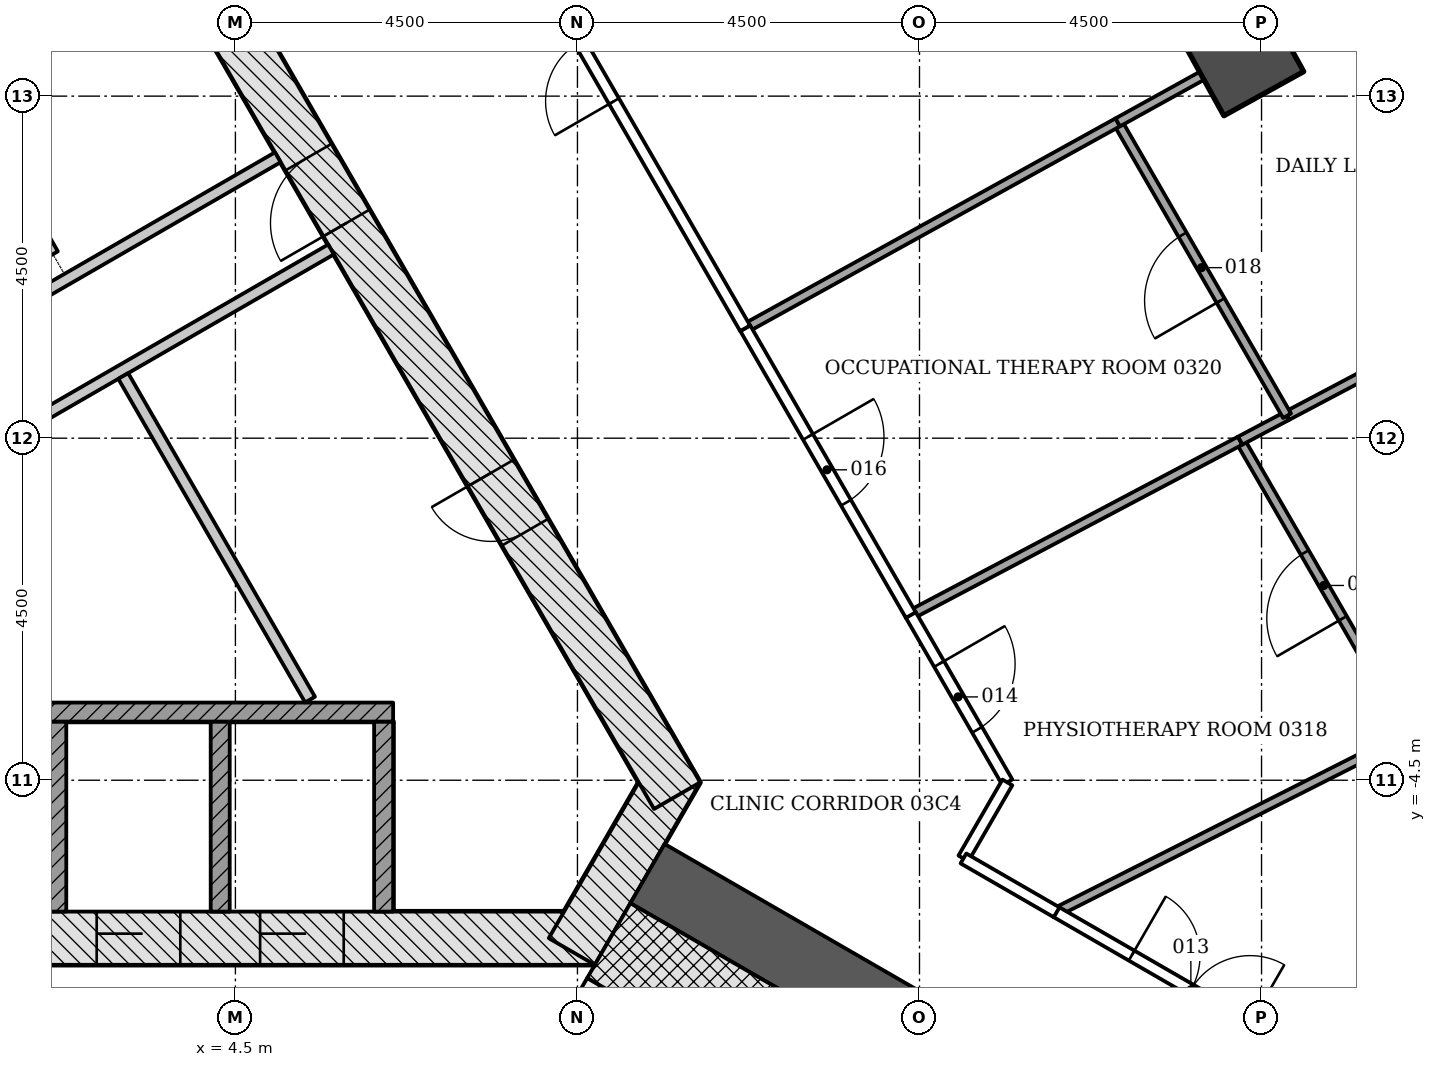
"""IFC4 building model, lengths in metres.
Left out: names, types, materials, properties, quantities, classifications, styles, units other than length and angle.
Written with IfcOpenShell. Run it as: python <this file> out.ifc"""

import sys

from ifc_helpers import new_model, si_unit, direction, frame, frame_2d, origin, origin_2d, place, context, subcontext, project, spatial, rectangle, extrude, element, fill, save


model = new_model("IFC4")
c1 = context("Model", 3, precision=1e-05, world=origin(), true_north=direction((0.0, 1.0)))
c2 = subcontext(c1, "Body", "Model", "MODEL_VIEW")
j1 = project(units=[si_unit("LENGTHUNIT", "METRE"), si_unit("PLANEANGLEUNIT", "RADIAN")], contexts=[c1])
p1 = place(None, origin())
s1 = spatial("IfcSite", under=j1, at=p1, CompositionType="ELEMENT")
p2 = place(p1, origin())
s2 = spatial("IfcBuilding", under=s1, at=p2, CompositionType="ELEMENT")
p3 = place(p2, frame((0.0, 0.0, 15.0)))
s3 = spatial("IfcBuildingStorey", under=s2, at=p3, CompositionType="ELEMENT", Elevation=15.0)
p4 = place(p3, frame((17.739, 5.058, -0.25), z_axis=(0.0, 0.0, 1.0), x_axis=(0.875152760281, 0.483846717641, 0.0)))
e1 = element("IfcColumn", 1, at=p4, inside=s3, PredefinedType="COLUMN", context=c2, shape_type="SweptSolid", body=[
    extrude(rectangle(XDim=1.2, YDim=1.2, at=origin_2d()), origin(), (0.0, 0.0, 1.0), 4.5),
])
p5 = place(p3, frame((-9.229, -6.578, -0.25), z_axis=(0.0, 0.0, 1.0), x_axis=(1.0, 0.0, 0.0)))
e2 = element("IfcWall", 2, at=p5, inside=s3, PredefinedType="SHEAR", context=c2, shape_type="SweptSolid", body=[
    extrude(rectangle(XDim=18.458, YDim=0.7, at=frame_2d((9.229, 0.0))), origin(), (0.0, 0.0, 1.0), 4.5),
])
p6 = place(p5, frame((3.304, 0.0, 0.25)))
e3 = element("IfcOpeningElement", 3, at=p6, cuts=e2, PredefinedType="OPENING", context=c2, shape_type="SweptSolid", body=[
    extrude(rectangle(XDim=1.1, YDim=2.1, at=frame_2d((0.55, 1.05))), frame((0.0, 0.36, 0.0), z_axis=(0.0, -1.0, 0.0), x_axis=(1.0, 0.0, 0.0)), (0.0, 0.0, 1.0), 0.72),
])
p7 = place(p5, frame((5.454, 0.0, 0.25)))
e4 = element("IfcOpeningElement", 4, at=p7, cuts=e2, PredefinedType="OPENING", context=c2, shape_type="SweptSolid", body=[
    extrude(rectangle(XDim=1.1, YDim=2.1, at=frame_2d((0.55, 1.05))), frame((0.0, 0.36, 0.0), z_axis=(0.0, -1.0, 0.0), x_axis=(1.0, 0.0, 0.0)), (0.0, 0.0, 1.0), 0.72),
])
p8 = place(p5, frame((7.604, 0.0, 0.25)))
e5 = element("IfcOpeningElement", 5, at=p8, cuts=e2, PredefinedType="OPENING", context=c2, shape_type="SweptSolid", body=[
    extrude(rectangle(XDim=1.1, YDim=2.1, at=frame_2d((0.55, 1.05))), frame((0.0, 0.36, 0.0), z_axis=(0.0, -1.0, 0.0), x_axis=(1.0, 0.0, 0.0)), (0.0, 0.0, 1.0), 0.72),
])
p9 = place(p5, frame((9.754, 0.0, 0.25)))
e6 = element("IfcOpeningElement", 6, at=p9, cuts=e2, PredefinedType="OPENING", context=c2, shape_type="SweptSolid", body=[
    extrude(rectangle(XDim=1.1, YDim=2.1, at=frame_2d((0.55, 1.05))), frame((0.0, 0.36, 0.0), z_axis=(0.0, -1.0, 0.0), x_axis=(1.0, 0.0, 0.0)), (0.0, 0.0, 1.0), 0.72),
])
p10 = place(p5, frame((11.904, 0.0, 0.25)))
e7 = element("IfcOpeningElement", 7, at=p10, cuts=e2, PredefinedType="OPENING", context=c2, shape_type="SweptSolid", body=[
    extrude(rectangle(XDim=1.1, YDim=2.1, at=frame_2d((0.55, 1.05))), frame((0.0, 0.36, 0.0), z_axis=(0.0, -1.0, 0.0), x_axis=(1.0, 0.0, 0.0)), (0.0, 0.0, 1.0), 0.72),
])
p11 = place(p5, frame((14.054, 0.0, 0.25)))
e8 = element("IfcOpeningElement", 8, at=p11, cuts=e2, PredefinedType="OPENING", context=c2, shape_type="SweptSolid", body=[
    extrude(rectangle(XDim=1.1, YDim=2.1, at=frame_2d((0.55, 1.05))), frame((0.0, 0.36, 0.0), z_axis=(0.0, -1.0, 0.0), x_axis=(1.0, 0.0, 0.0)), (0.0, 0.0, 1.0), 0.72),
])
p12 = place(p5, frame((1.079, 0.0, 0.25)))
e9 = element("IfcOpeningElement", 9, at=p12, cuts=e2, PredefinedType="OPENING", context=c2, shape_type="SweptSolid", body=[
    extrude(rectangle(XDim=0.9, YDim=2.1, at=frame_2d((0.45, 1.05))), frame((0.0, 0.36, 0.0), z_axis=(0.0, -1.0, 0.0), x_axis=(1.0, 0.0, 0.0)), (0.0, 0.0, 1.0), 0.72),
])
p13 = place(p3, frame((8.926, -6.753, -0.25), z_axis=(0.0, 0.0, 1.0), x_axis=(0.500042739161, 0.866000726912, 0.0)))
e10 = element("IfcWall", 10, at=p13, inside=s3, PredefinedType="SHEAR", context=c2, shape_type="SweptSolid", body=[
    extrude(rectangle(XDim=2.771, YDim=0.7, at=frame_2d((1.386, 0.0))), origin(), (0.0, 0.0, 1.0), 4.5),
])
p14 = place(p3, frame((10.311, -4.703, -0.25), z_axis=(0.0, 0.0, 1.0), x_axis=(-0.500001446645, 0.866024568562, 0.0)))
e11 = element("IfcWall", 11, at=p14, inside=s3, PredefinedType="SHEAR", context=c2, shape_type="SweptSolid", body=[
    extrude(rectangle(XDim=18.458, YDim=0.7, at=frame_2d((9.229, 0.0))), origin(), (0.0, 0.0, 1.0), 4.5),
])
p15 = place(p14, frame((8.7, 0.0, 0.25)))
e12 = element("IfcOpeningElement", 12, at=p15, cuts=e11, PredefinedType="OPENING", context=c2, shape_type="SweptSolid", body=[
    extrude(rectangle(XDim=1.0, YDim=2.1, at=frame_2d((0.5, 1.05))), frame((0.0, 0.36, 0.0), z_axis=(0.0, -1.0, 0.0), x_axis=(1.0, 0.0, 0.0)), (0.0, 0.0, 1.0), 0.72),
])
p16 = place(p14, frame((4.002, 0.0, 0.25)))
e13 = element("IfcOpeningElement", 13, at=p16, cuts=e11, PredefinedType="OPENING", context=c2, shape_type="SweptSolid", body=[
    extrude(rectangle(XDim=0.9, YDim=2.1, at=frame_2d((0.45, 1.05))), frame((0.0, 0.36, 0.0), z_axis=(0.0, -1.0, 0.0), x_axis=(1.0, 0.0, 0.0)), (0.0, 0.0, 1.0), 0.72),
])
p17 = place(p14, frame((14.093, 0.0, 0.25)))
e14 = element("IfcOpeningElement", 14, at=p17, cuts=e11, PredefinedType="OPENING", context=c2, shape_type="SweptSolid", body=[
    extrude(rectangle(XDim=0.9, YDim=2.1, at=frame_2d((0.45, 1.05))), frame((0.0, 0.36, 0.0), z_axis=(0.0, -1.0, 0.0), x_axis=(1.0, 0.0, 0.0)), (0.0, 0.0, 1.0), 0.72),
])
p18 = place(p3, frame((9.922, -5.728, -0.25), z_axis=(0.0, 0.0, 1.0), x_axis=(0.866028046028, -0.499995423472, 0.0)))
e15 = element("IfcWall", 15, at=p18, inside=s3, PredefinedType="SHEAR", context=c2, shape_type="SweptSolid", body=[
    extrude(rectangle(XDim=14.633, YDim=0.9, at=frame_2d((7.316, 0.0))), origin(), (0.0, 0.0, 1.0), 4.5),
])
p19 = place(p18, frame((7.35, 0.0, 0.25)))
e16 = element("IfcOpeningElement", 16, at=p19, cuts=e15, PredefinedType="OPENING", context=c2, shape_type="SweptSolid", body=[
    extrude(rectangle(XDim=1.5, YDim=2.1, at=frame_2d((0.75, 1.05))), frame((0.0, 0.46, 0.0), z_axis=(0.0, -1.0, 0.0), x_axis=(1.0, 0.0, 0.0)), (0.0, 0.0, 1.0), 0.92),
])
for number, where, z_axis, x_axis in (
    (17, (2.15, -6.228, -0.25), (0.0, 0.0, 1.0), (0.0, 1.0, 0.0)),
    (18, (4.3, -6.228, -0.25), (0.0, 0.0, 1.0), (0.0, 1.0, 0.0)),
    (19, (6.45, -6.228, -0.25), (0.0, 0.0, 1.0), (0.0, 1.0, 0.0)),
):
    element("IfcWall", number, at=place(p3, frame(where, z_axis=z_axis, x_axis=x_axis)), inside=s3, PredefinedType="PARTITIONING", context=c2, shape_type="SweptSolid", body=[
        extrude(rectangle(XDim=2.5, YDim=0.25, at=frame_2d((1.25, 0.0))), origin(), (0.0, 0.0, 1.0), 4.5),
    ])
p20 = place(p3, frame((-6.575, -3.603, 0.0), z_axis=(0.0, 0.0, 1.0), x_axis=(1.0, 0.0, 0.0)))
e20 = element("IfcWall", 20, at=p20, inside=s3, PredefinedType="PARTITIONING", context=c2, shape_type="SweptSolid", body=[
    extrude(rectangle(XDim=13.15, YDim=0.25, at=frame_2d((6.575, 0.0))), origin(), (0.0, 0.0, 1.0), 4.25),
])
p21 = place(p3, frame((-4.548, -1.851, 0.0), z_axis=(0.0, 0.0, 1.0), x_axis=(0.866023939251, 0.500002536638, 0.0)))
e21 = element("IfcWall", 21, at=p21, inside=s3, PredefinedType="PARTITIONING", context=c2, shape_type="SweptSolid", body=[
    extrude(rectangle(XDim=11.092, YDim=0.15, at=frame_2d((5.546, 0.0))), origin(), (0.0, 0.0, 1.0), 4.25),
])
p22 = place(p21, frame((3.497, 0.0, 0.0)))
e22 = element("IfcOpeningElement", 22, at=p22, cuts=e21, PredefinedType="OPENING", context=c2, shape_type="SweptSolid", body=[
    extrude(rectangle(XDim=0.9, YDim=2.1, at=frame_2d((0.45, 1.05))), frame((0.0, 0.085, 0.0), z_axis=(0.0, -1.0, 0.0), x_axis=(1.0, 0.0, 0.0)), (0.0, 0.0, 1.0), 0.17),
])
p23 = place(p3, frame((2.099, 2.42, 0.0), z_axis=(0.0, 0.0, 1.0), x_axis=(-0.499998449073, 0.866026299211, 0.0)))
e23 = element("IfcWall", 23, at=p23, inside=s3, PredefinedType="PARTITIONING", context=c2, shape_type="SweptSolid", body=[
    extrude(rectangle(XDim=4.211, YDim=0.15, at=frame_2d((2.106, 0.0))), origin(), (0.0, 0.0, 1.0), 4.25),
])
p24 = place(p3, frame((-4.454, -3.413, 0.0), z_axis=(0.0, 0.0, 1.0), x_axis=(0.86603043987, 0.499991277142, 0.0)))
e24 = element("IfcWall", 24, at=p24, inside=s3, PredefinedType="PARTITIONING", context=c2, shape_type="SweptSolid", body=[
    extrude(rectangle(XDim=11.792, YDim=0.15, at=frame_2d((5.896, 0.0))), origin(), (0.0, 0.0, 1.0), 4.25),
])
p25 = place(p24, frame((3.847, 0.0, 0.0)))
e25 = element("IfcOpeningElement", 25, at=p25, cuts=e24, PredefinedType="OPENING", context=c2, shape_type="SweptSolid", body=[
    extrude(rectangle(XDim=0.9, YDim=2.1, at=frame_2d((0.45, 1.05))), frame((0.0, 0.085, 0.0), z_axis=(0.0, -1.0, 0.0), x_axis=(1.0, 0.0, 0.0)), (0.0, 0.0, 1.0), 0.17),
])
p26 = place(p3, frame((5.482, -3.439, 0.0), z_axis=(0.0, 0.0, 1.0), x_axis=(-0.500006183238, 0.866021833861, 0.0)))
e26 = element("IfcWall", 26, at=p26, inside=s3, PredefinedType="PARTITIONING", context=c2, shape_type="SweptSolid", body=[
    extrude(rectangle(XDim=4.916, YDim=0.15, at=frame_2d((2.458, 0.0))), origin(), (0.0, 0.0, 1.0), 4.25),
])
p27 = place(p3, frame((7.44, -10.226, -0.25), z_axis=(0.0, 0.0, 1.0), x_axis=(0.500022077904, 0.866012656725, 0.0)))
e27 = element("IfcWall", 27, at=p27, inside=s3, PredefinedType="SHEAR", context=c2, shape_type="SweptSolid", body=[
    extrude(rectangle(XDim=3.55, YDim=0.2, at=frame_2d((1.775, 0.0))), origin(), (0.0, 0.0, 1.0), 4.5),
])
p28 = place(p27, frame((1.175, 0.0, 0.25)))
e28 = element("IfcOpeningElement", 28, at=p28, cuts=e27, PredefinedType="OPENING", context=c2, shape_type="SweptSolid", body=[
    extrude(rectangle(XDim=1.2, YDim=2.1, at=frame_2d((0.6, 1.05))), frame((0.0, 0.11, 0.0), z_axis=(0.0, -1.0, 0.0), x_axis=(1.0, 0.0, 0.0)), (0.0, 0.0, 1.0), 0.22),
])
p29 = place(p3, frame((9.413, -6.61, -0.25), z_axis=(0.0, 0.0, 1.0), x_axis=(0.866018442252, -0.500012057535, 0.0)))
e29 = element("IfcWall", 29, at=p29, inside=s3, PredefinedType="SHEAR", context=c2, shape_type="SweptSolid", body=[
    extrude(rectangle(XDim=7.2, YDim=1.136, at=frame_2d((3.6, 0.0))), origin(), (0.0, 0.0, 1.0), 4.5),
])
p30 = place(p3, frame((19.942, -3.888, 0.0), z_axis=(0.0, 0.0, 1.0), x_axis=(-0.89243804137, -0.451169970539, 0.0)))
e30 = element("IfcWall", 30, at=p30, inside=s3, PredefinedType="PARTITIONING", context=c2, shape_type="SweptSolid", body=[
    extrude(rectangle(XDim=5.202, YDim=0.12, at=frame_2d((2.601, 0.0))), origin(), (0.0, 0.0, 1.0), 3.638),
])
p31 = place(p3, frame((15.295, -6.232, 0.0), z_axis=(0.0, 0.0, 1.0), x_axis=(0.865991915229, -0.500057999394, 0.0)))
e31 = element("IfcWall", 31, at=p31, inside=s3, PredefinedType="PARTITIONING", context=c2, shape_type="SweptSolid", body=[
    extrude(rectangle(XDim=4.094, YDim=0.15, at=frame_2d((2.047, 0.0))), origin(), (0.0, 0.0, 1.0), 3.638),
])
p32 = place(p31, frame((1.15, 0.0, 0.0)))
e32 = element("IfcOpeningElement", 32, at=p32, cuts=e31, PredefinedType="OPENING", context=c2, shape_type="SweptSolid", body=[
    extrude(rectangle(XDim=1.8, YDim=2.1, at=frame_2d((0.9, 1.05))), frame((0.0, 0.085, 0.0), z_axis=(0.0, -1.0, 0.0), x_axis=(1.0, 0.0, 0.0)), (0.0, 0.0, 1.0), 0.17),
])
p33 = place(p3, frame((19.944, -3.886, 0.0), z_axis=(0.0, 0.0, 1.0), x_axis=(-0.500092923031, 0.865971748, 0.0)))
e33 = element("IfcWall", 33, at=p33, inside=s3, PredefinedType="PARTITIONING", context=c2, shape_type="SweptSolid", body=[
    extrude(rectangle(XDim=4.449, YDim=0.12, at=frame_2d((2.225, 0.0))), origin(), (0.0, 0.0, 1.0), 3.638),
])
p34 = place(p33, frame((1.75, 0.0, 0.0)))
e34 = element("IfcOpeningElement", 34, at=p34, cuts=e33, PredefinedType="OPENING", context=c2, shape_type="SweptSolid", body=[
    extrude(rectangle(XDim=1.0, YDim=2.1, at=frame_2d((0.5, 1.05))), frame((0.0, 0.07, 0.0), z_axis=(0.0, -1.0, 0.0), x_axis=(1.0, 0.0, 0.0)), (0.0, 0.0, 1.0), 0.14),
])
p35 = place(p3, frame((17.717, -0.034, 0.0), z_axis=(0.0, 0.0, 1.0), x_axis=(-0.884117284138, -0.467265051003, 0.0)))
e35 = element("IfcWall", 35, at=p35, inside=s3, PredefinedType="PARTITIONING", context=c2, shape_type="SweptSolid", body=[
    extrude(rectangle(XDim=4.901, YDim=0.12, at=frame_2d((2.45, 0.0))), origin(), (0.0, 0.0, 1.0), 3.638),
])
p36 = place(p3, frame((13.383, -2.321, 0.0), z_axis=(0.0, 0.0, 1.0), x_axis=(0.499788837842, -0.866147283993, 0.0)))
e36 = element("IfcWall", 36, at=p36, inside=s3, PredefinedType="PARTITIONING", context=c2, shape_type="SweptSolid", body=[
    extrude(rectangle(XDim=2.547, YDim=0.15, at=frame_2d((1.273, 0.0))), origin(), (0.0, 0.0, 1.0), 3.638),
])
p37 = place(p36, frame((0.75, 0.0, 0.0)))
e37 = element("IfcOpeningElement", 37, at=p37, cuts=e36, PredefinedType="OPENING", context=c2, shape_type="SweptSolid", body=[
    extrude(rectangle(XDim=1.0, YDim=2.1, at=frame_2d((0.5, 1.05))), frame((0.0, 0.085, 0.0), z_axis=(0.0, -1.0, 0.0), x_axis=(1.0, 0.0, 0.0)), (0.0, 0.0, 1.0), 0.17),
])
p38 = place(p3, frame((14.656, -4.529, 0.0), z_axis=(0.0, 0.0, 1.0), x_axis=(-0.500502949238, -0.865734831114, 0.0)))
e38 = element("IfcWall", 38, at=p38, inside=s3, PredefinedType="PARTITIONING", context=c2, shape_type="SweptSolid", body=[
    extrude(rectangle(XDim=1.155, YDim=0.15, at=frame_2d((0.578, 0.0))), origin(), (0.0, 0.0, 1.0), 4.25),
])
p39 = place(p3, frame((14.078, -5.529, 0.0), z_axis=(0.0, 0.0, 1.0), x_axis=(0.865984561414, -0.500070734389, 0.0)))
e39 = element("IfcWall", 39, at=p39, inside=s3, PredefinedType="PARTITIONING", context=c2, shape_type="SweptSolid", body=[
    extrude(rectangle(XDim=1.416, YDim=0.15, at=frame_2d((0.708, 0.0))), origin(), (0.0, 0.0, 1.0), 3.638),
])
p40 = place(p3, frame((18.336, 0.294, 0.0), z_axis=(0.0, 0.0, 1.0), x_axis=(-0.883890154601, -0.467694552672, 0.0)))
e40 = element("IfcWall", 40, at=p40, inside=s3, PredefinedType="PARTITIONING", context=c2, shape_type="SweptSolid", body=[
    extrude(rectangle(XDim=0.697, YDim=0.12, at=frame_2d((0.348, 0.0))), origin(), (0.0, 0.0, 1.0), 3.638),
])
p41 = place(p3, frame((19.875, 1.108, 0.0), z_axis=(0.0, 0.0, 1.0), x_axis=(-0.884094940295, -0.467307325584, 0.0)))
e41 = element("IfcWall", 41, at=p41, inside=s3, PredefinedType="PARTITIONING", context=c2, shape_type="SweptSolid", body=[
    extrude(rectangle(XDim=1.74, YDim=0.12, at=frame_2d((0.87, 0.0))), origin(), (0.0, 0.0, 1.0), 3.638),
])
p42 = place(p3, frame((18.336, 0.295, 0.0), z_axis=(0.0, 0.0, 1.0), x_axis=(-0.499992780121, 0.866029572143, 0.0)))
e42 = element("IfcWall", 42, at=p42, inside=s3, PredefinedType="PARTITIONING", context=c2, shape_type="SweptSolid", body=[
    extrude(rectangle(XDim=4.456, YDim=0.12, at=frame_2d((2.228, 0.0))), origin(), (0.0, 0.0, 1.0), 3.638),
])
p43 = place(p42, frame((1.75, 0.0, 0.0)))
e43 = element("IfcOpeningElement", 43, at=p43, cuts=e42, PredefinedType="OPENING", context=c2, shape_type="SweptSolid", body=[
    extrude(rectangle(XDim=1.0, YDim=2.1, at=frame_2d((0.5, 1.05))), frame((0.0, 0.07, 0.0), z_axis=(0.0, -1.0, 0.0), x_axis=(1.0, 0.0, 0.0)), (0.0, 0.0, 1.0), 0.14),
])
p44 = place(p3, frame((11.208, 1.446, 0.0), z_axis=(0.0, 0.0, 1.0), x_axis=(0.49994237214, -0.866058672688, 0.0)))
e44 = element("IfcWall", 44, at=p44, inside=s3, PredefinedType="PARTITIONING", context=c2, shape_type="SweptSolid", body=[
    extrude(rectangle(XDim=4.356, YDim=0.15, at=frame_2d((2.178, 0.0))), origin(), (0.0, 0.0, 1.0), 3.638),
])
p45 = place(p44, frame((1.65, 0.0, 0.0)))
e45 = element("IfcOpeningElement", 45, at=p45, cuts=e44, PredefinedType="OPENING", context=c2, shape_type="SweptSolid", body=[
    extrude(rectangle(XDim=1.0, YDim=2.1, at=frame_2d((0.5, 1.05))), frame((0.0, 0.085, 0.0), z_axis=(0.0, -1.0, 0.0), x_axis=(1.0, 0.0, 0.0)), (0.0, 0.0, 1.0), 0.17),
])
p46 = place(p3, frame((16.108, 4.155, 0.0), z_axis=(0.0, 0.0, 1.0), x_axis=(-0.87515505143, -0.483842573526, 0.0)))
e46 = element("IfcWall", 46, at=p46, inside=s3, PredefinedType="PARTITIONING", context=c2, shape_type="SweptSolid", body=[
    extrude(rectangle(XDim=5.599, YDim=0.12, at=frame_2d((2.799, 0.0))), origin(), (0.0, 0.0, 1.0), 3.638),
])
p47 = place(p3, frame((17.214, 4.767, 0.0), z_axis=(0.0, 0.0, 1.0), x_axis=(-0.874994011196, -0.484133742235, 0.0)))
e47 = element("IfcWall", 47, at=p47, inside=s3, PredefinedType="PARTITIONING", context=c2, shape_type="SweptSolid", body=[
    extrude(rectangle(XDim=1.264, YDim=0.12, at=frame_2d((0.632, 0.0))), origin(), (0.0, 0.0, 1.0), 3.638),
])
p48 = place(p3, frame((11.206, 1.446, 0.0), z_axis=(0.0, 0.0, 1.0), x_axis=(-0.500116761363, 0.865957981085, 0.0)))
e48 = element("IfcWall", 48, at=p48, inside=s3, PredefinedType="PARTITIONING", context=c2, shape_type="SweptSolid", body=[
    extrude(rectangle(XDim=8.7, YDim=0.15, at=frame_2d((4.35, 0.0))), origin(), (0.0, 0.0, 1.0), 3.638),
])
p49 = place(p48, frame((3.45, 0.0, 0.0)))
e49 = element("IfcOpeningElement", 49, at=p49, cuts=e48, PredefinedType="OPENING", context=c2, shape_type="SweptSolid", body=[
    extrude(rectangle(XDim=1.8, YDim=2.1, at=frame_2d((0.9, 1.05))), frame((0.0, 0.085, 0.0), z_axis=(0.0, -1.0, 0.0), x_axis=(1.0, 0.0, 0.0)), (0.0, 0.0, 1.0), 0.17),
])
p50 = place(p10, origin())
e50 = element("IfcDoor", 50, at=p50, inside=s3, OperationType="DOUBLE_DOOR_SLIDING", PredefinedType="DOOR", context=c2, shape_type="SweptSolid", body=[
    extrude(rectangle(XDim=1.1, YDim=2.1, at=frame_2d((0.55, 1.05))), frame((0.0, 0.025, 0.0), z_axis=(0.0, -1.0, 0.0), x_axis=(1.0, 0.0, 0.0)), (0.0, 0.0, 1.0), 0.05),
])
fill(e7, e50)
p51 = place(p11, origin())
e51 = element("IfcDoor", 51, at=p51, inside=s3, OperationType="DOUBLE_DOOR_SLIDING", PredefinedType="DOOR", context=c2, shape_type="SweptSolid", body=[
    extrude(rectangle(XDim=1.1, YDim=2.1, at=frame_2d((0.55, 1.05))), frame((0.0, 0.025, 0.0), z_axis=(0.0, -1.0, 0.0), x_axis=(1.0, 0.0, 0.0)), (0.0, 0.0, 1.0), 0.05),
])
fill(e8, e51)
p52 = place(p15, origin())
e52 = element("IfcDoor", 52, at=p52, inside=s3, OperationType="SINGLE_SWING_LEFT", PredefinedType="DOOR", context=c2, shape_type="SweptSolid", body=[
    extrude(rectangle(XDim=1.0, YDim=2.1, at=frame_2d((0.5, 1.05))), frame((0.0, 0.075, 0.0), z_axis=(0.0, -1.0, 0.0), x_axis=(1.0, 0.0, 0.0)), (0.0, 0.0, 1.0), 0.15),
])
fill(e12, e52)
p53 = place(p16, origin())
e53 = element("IfcDoor", 53, at=p53, inside=s3, OperationType="SINGLE_SWING_RIGHT", PredefinedType="DOOR", context=c2, shape_type="SweptSolid", body=[
    extrude(rectangle(XDim=0.9, YDim=2.1, at=frame_2d((0.45, 1.05))), frame((0.0, 0.075, 0.0), z_axis=(0.0, -1.0, 0.0), x_axis=(1.0, 0.0, 0.0)), (0.0, 0.0, 1.0), 0.15),
])
fill(e13, e53)
p54 = place(p32, origin())
e54 = element("IfcDoor", 54, at=p54, inside=s3, OperationType="DOUBLE_DOOR_SINGLE_SWING", PredefinedType="DOOR", context=c2, shape_type="SweptSolid", body=[
    extrude(rectangle(XDim=1.8, YDim=2.1, at=frame_2d((0.9, 1.05))), frame((0.0, 0.025, 0.0), z_axis=(0.0, -1.0, 0.0), x_axis=(1.0, 0.0, 0.0)), (0.0, 0.0, 1.0), 0.05),
])
fill(e32, e54)
p55 = place(p37, origin())
e55 = element("IfcDoor", 55, at=p55, inside=s3, OperationType="SINGLE_SWING_LEFT", PredefinedType="DOOR", context=c2, shape_type="SweptSolid", body=[
    extrude(rectangle(XDim=1.0, YDim=2.1, at=frame_2d((0.5, 1.05))), frame((0.0, 0.025, 0.0), z_axis=(0.0, -1.0, 0.0), x_axis=(1.0, 0.0, 0.0)), (0.0, 0.0, 1.0), 0.05),
])
fill(e37, e55)
p56 = place(p34, origin())
e56 = element("IfcDoor", 56, at=p56, inside=s3, OperationType="SINGLE_SWING_LEFT", PredefinedType="DOOR", context=c2, shape_type="SweptSolid", body=[
    extrude(rectangle(XDim=1.0, YDim=2.1, at=frame_2d((0.5, 1.05))), frame((0.0, 0.025, 0.0), z_axis=(0.0, -1.0, 0.0), x_axis=(1.0, 0.0, 0.0)), (0.0, 0.0, 1.0), 0.05),
])
fill(e34, e56)
p57 = place(p45, origin())
e57 = element("IfcDoor", 57, at=p57, inside=s3, OperationType="SINGLE_SWING_LEFT", PredefinedType="DOOR", context=c2, shape_type="SweptSolid", body=[
    extrude(rectangle(XDim=1.0, YDim=2.1, at=frame_2d((0.5, 1.05))), frame((0.0, 0.025, 0.0), z_axis=(0.0, -1.0, 0.0), x_axis=(1.0, 0.0, 0.0)), (0.0, 0.0, 1.0), 0.05),
])
fill(e45, e57)
p58 = place(p43, origin())
e58 = element("IfcDoor", 58, at=p58, inside=s3, OperationType="SINGLE_SWING_LEFT", PredefinedType="DOOR", context=c2, shape_type="SweptSolid", body=[
    extrude(rectangle(XDim=1.0, YDim=2.1, at=frame_2d((0.5, 1.05))), frame((0.0, 0.025, 0.0), z_axis=(0.0, -1.0, 0.0), x_axis=(1.0, 0.0, 0.0)), (0.0, 0.0, 1.0), 0.05),
])
fill(e43, e58)
p59 = place(p49, origin())
e59 = element("IfcDoor", 59, at=p59, inside=s3, OperationType="DOUBLE_DOOR_SINGLE_SWING", PredefinedType="DOOR", context=c2, shape_type="SweptSolid", body=[
    extrude(rectangle(XDim=1.8, YDim=2.1, at=frame_2d((0.9, 1.05))), frame((0.0, 0.025, 0.0), z_axis=(0.0, -1.0, 0.0), x_axis=(1.0, 0.0, 0.0)), (0.0, 0.0, 1.0), 0.05),
])
fill(e49, e59)
save(model, sys.argv[1])
